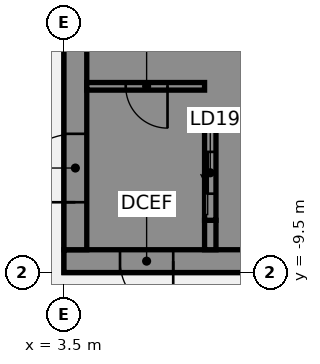
"""IFC4 building model, lengths in metres.
Left out: names, types, materials, properties, quantities, classifications, styles, units other than length and angle.
Written with IfcOpenShell. Run it as: python <this file> out.ifc"""

import sys

from ifc_helpers import new_model, si_unit, direction, frame, frame_2d, origin, place, context, subcontext, project, spatial, polyline, rectangle, outline, extrude, element, fill, save


model = new_model("IFC4")
c1 = context("Model", 3, precision=1e-05, world=origin(), true_north=direction((0.0, 1.0)))
c2 = subcontext(c1, "Body", "Model", "MODEL_VIEW")
j1 = project(units=[si_unit("LENGTHUNIT", "METRE"), si_unit("PLANEANGLEUNIT", "RADIAN")], contexts=[c1])
p1 = place(None, origin())
s1 = spatial("IfcSite", under=j1, at=p1, CompositionType="ELEMENT")
p2 = place(p1, origin())
s2 = spatial("IfcBuilding", under=s1, at=p2, CompositionType="ELEMENT")
p3 = place(p2, frame((0.0, 0.0, 174.25)))
s3 = spatial("IfcBuildingStorey", under=s2, at=p3, CompositionType="ELEMENT", Elevation=174.25)
p4 = place(p3, frame((16.5, -9.2, 0.0), z_axis=(0.0, 0.0, 1.0), x_axis=(-1.0, 0.0, 0.0)))
e1 = element("IfcWall", 1, at=p4, inside=s3, PredefinedType="SHEAR", context=c2, shape_type="SweptSolid", body=[
    extrude(rectangle(XDim=13.0, YDim=0.6, at=frame_2d((6.5, 0.0))), origin(), (0.0, 0.0, 1.0), 3.57),
])
p5 = place(p4, frame((4.15, 0.0, 0.0)))
e2 = element("IfcOpeningElement", 2, at=p5, cuts=e1, PredefinedType="OPENING", context=c2, shape_type="SweptSolid", body=[
    extrude(rectangle(XDim=1.4, YDim=2.1, at=frame_2d((0.7, 1.05))), frame((0.0, 0.31, 0.0), z_axis=(0.0, -1.0, 0.0), x_axis=(1.0, 0.0, 0.0)), (0.0, 0.0, 1.0), 0.62),
])
p6 = place(p4, frame((10.125, 0.0, 0.0)))
e3 = element("IfcOpeningElement", 3, at=p6, cuts=e1, PredefinedType="OPENING", context=c2, shape_type="SweptSolid", body=[
    extrude(rectangle(XDim=1.4, YDim=2.1, at=frame_2d((0.7, 1.05))), frame((0.0, 0.31, 0.0), z_axis=(0.0, -1.0, 0.0), x_axis=(1.0, 0.0, 0.0)), (0.0, 0.0, 1.0), 0.62),
])
p7 = place(p3, origin())
e4 = element("IfcWall", 4, at=p7, inside=s3, PredefinedType="SHEAR", context=c2, shape_type="SweptSolid", body=[
    extrude(outline(polyline([(9.8, -5.375), (7.5, -5.375), (7.5, -2.875), (9.8, -2.875), (9.8, -2.625), (7.5, -2.625), (7.5, -0.125), (9.8, -0.125), (9.8, 0.125), (7.5, 0.125), (7.5, 2.625), (9.8, 2.625), (9.8, 2.875), (7.5, 2.875), (7.5, 5.375), (9.8, 5.375), (9.8, 5.625), (7.5, 5.625), (7.5, 8.125), (9.8, 8.125), (9.8, 8.9), (7.5, 8.9), (7.2, 8.9), (7.2, -5.625), (7.5, -5.625), (9.8, -5.625), (9.8, -5.375)])), origin(), (0.0, 0.0, 1.0), 3.57),
])
p8 = place(p3, origin())
e5 = element("IfcWall", 5, at=p8, inside=s3, PredefinedType="SHEAR", context=c2, shape_type="SweptSolid", body=[
    extrude(outline(polyline([(7.5, -8.125), (7.5, -8.9), (9.8, -8.9), (9.8, -8.125), (9.8, -5.625), (9.55, -5.625), (9.55, -8.125), (7.5, -8.125)])), origin(), (0.0, 0.0, 1.0), 3.57),
])
p9 = place(p3, frame((7.35, -8.9, 0.0), z_axis=(0.0, 0.0, 1.0), x_axis=(0.0, 1.0, 0.0)))
e6 = element("IfcWall", 6, at=p9, inside=s3, PredefinedType="SHEAR", context=c2, shape_type="SweptSolid", body=[
    extrude(rectangle(XDim=0.775, YDim=0.3, at=frame_2d((0.387, 0.0))), origin(), (0.0, 0.0, 1.0), 3.57),
])
p10 = place(p3, frame((7.35, -8.125, 0.0), z_axis=(0.0, 0.0, 1.0), x_axis=(0.0, 1.0, 0.0)))
e7 = element("IfcWall", 7, at=p10, inside=s3, PredefinedType="SHEAR", context=c2, shape_type="SweptSolid", body=[
    extrude(rectangle(XDim=2.5, YDim=0.3, at=frame_2d((1.25, 0.0))), origin(), (0.0, 0.0, 1.0), 3.57),
])
p11 = place(p10, frame((0.7, 0.0, 0.0)))
e8 = element("IfcOpeningElement", 8, at=p11, cuts=e7, PredefinedType="OPENING", context=c2, shape_type="SweptSolid", body=[
    extrude(rectangle(XDim=1.1, YDim=2.1, at=frame_2d((0.55, 1.05))), frame((0.0, 0.16, 0.0), z_axis=(0.0, -1.0, 0.0), x_axis=(1.0, 0.0, 0.0)), (0.0, 0.0, 1.0), 0.32),
])
p12 = place(p3, frame((3.8, -8.9, 0.0), z_axis=(0.0, 0.0, 1.0), x_axis=(0.0, 1.0, 0.0)))
e9 = element("IfcWall", 9, at=p12, inside=s3, PredefinedType="SHEAR", context=c2, shape_type="SweptSolid", body=[
    extrude(rectangle(XDim=17.8, YDim=0.6, at=frame_2d((8.9, 0.0))), origin(), (0.0, 0.0, 1.0), 3.57),
])
p13 = place(p12, frame((1.25, 0.0, 0.0)))
e10 = element("IfcOpeningElement", 10, at=p13, cuts=e9, PredefinedType="OPENING", context=c2, shape_type="SweptSolid", body=[
    extrude(rectangle(XDim=1.8, YDim=2.1, at=frame_2d((0.9, 1.05))), frame((0.0, 0.31, 0.0), z_axis=(0.0, -1.0, 0.0), x_axis=(1.0, 0.0, 0.0)), (0.0, 0.0, 1.0), 0.62),
])
p14 = place(p12, frame((13.8, 0.0, 0.0)))
e11 = element("IfcOpeningElement", 11, at=p14, cuts=e9, PredefinedType="OPENING", context=c2, shape_type="SweptSolid", body=[
    extrude(rectangle(XDim=1.0, YDim=2.1, at=frame_2d((0.5, 1.05))), frame((0.0, 0.31, 0.0), z_axis=(0.0, -1.0, 0.0), x_axis=(1.0, 0.0, 0.0)), (0.0, 0.0, 1.0), 0.62),
])
p15 = place(p3, frame((7.2, -4.6, 0.0), z_axis=(0.0, 0.0, 1.0), x_axis=(-1.0, 0.0, 0.0)))
e12 = element("IfcWall", 12, at=p15, inside=s3, PredefinedType="SHEAR", context=c2, shape_type="SweptSolid", body=[
    extrude(rectangle(XDim=3.1, YDim=0.2, at=frame_2d((1.55, 0.0))), origin(), (0.0, 0.0, 1.0), 3.57),
])
p16 = place(p15, frame((0.975, 0.0, 0.0)))
e13 = element("IfcOpeningElement", 13, at=p16, cuts=e12, PredefinedType="OPENING", context=c2, shape_type="SweptSolid", body=[
    extrude(rectangle(XDim=1.1, YDim=2.1, at=frame_2d((0.55, 1.05))), frame((0.0, 0.11, 0.0), z_axis=(0.0, -1.0, 0.0), x_axis=(1.0, 0.0, 0.0)), (0.0, 0.0, 1.0), 0.22),
])
p17 = place(p6, origin())
e14 = element("IfcDoor", 14, at=p17, inside=s3, OperationType="SINGLE_SWING_LEFT", PredefinedType="DOOR", context=c2, shape_type="SweptSolid", body=[
    extrude(rectangle(XDim=1.4, YDim=2.1, at=frame_2d((0.7, 1.05))), frame((0.0, 0.025, 0.0), z_axis=(0.0, -1.0, 0.0), x_axis=(1.0, 0.0, 0.0)), (0.0, 0.0, 1.0), 0.05),
])
fill(e3, e14)
p18 = place(p13, origin())
e15 = element("IfcDoor", 15, at=p18, inside=s3, OperationType="SINGLE_SWING_LEFT", PredefinedType="DOOR", context=c2, shape_type="SweptSolid", body=[
    extrude(rectangle(XDim=1.8, YDim=2.1, at=frame_2d((0.9, 1.05))), frame((0.0, 0.025, 0.0), z_axis=(0.0, -1.0, 0.0), x_axis=(1.0, 0.0, 0.0)), (0.0, 0.0, 1.0), 0.05),
])
fill(e10, e15)
p19 = place(p16, origin())
e16 = element("IfcDoor", 16, at=p19, inside=s3, OperationType="SINGLE_SWING_LEFT", PredefinedType="DOOR", context=c2, shape_type="SweptSolid", body=[
    extrude(rectangle(XDim=1.1, YDim=2.1, at=frame_2d((0.55, 1.05))), frame((0.0, 0.025, 0.0), z_axis=(0.0, -1.0, 0.0), x_axis=(1.0, 0.0, 0.0)), (0.0, 0.0, 1.0), 0.05),
])
fill(e13, e16)
p20 = place(p11, origin())
e17 = element("IfcDoor", 17, at=p20, inside=s3, OperationType="SLIDING_TO_LEFT", PredefinedType="DOOR", context=c2, shape_type="SweptSolid", body=[
    extrude(rectangle(XDim=1.1, YDim=2.1, at=frame_2d((0.55, 1.05))), frame((0.0, 0.025, 0.0), z_axis=(0.0, -1.0, 0.0), x_axis=(1.0, 0.0, 0.0)), (0.0, 0.0, 1.0), 0.05),
])
fill(e8, e17)
save(model, sys.argv[1])
